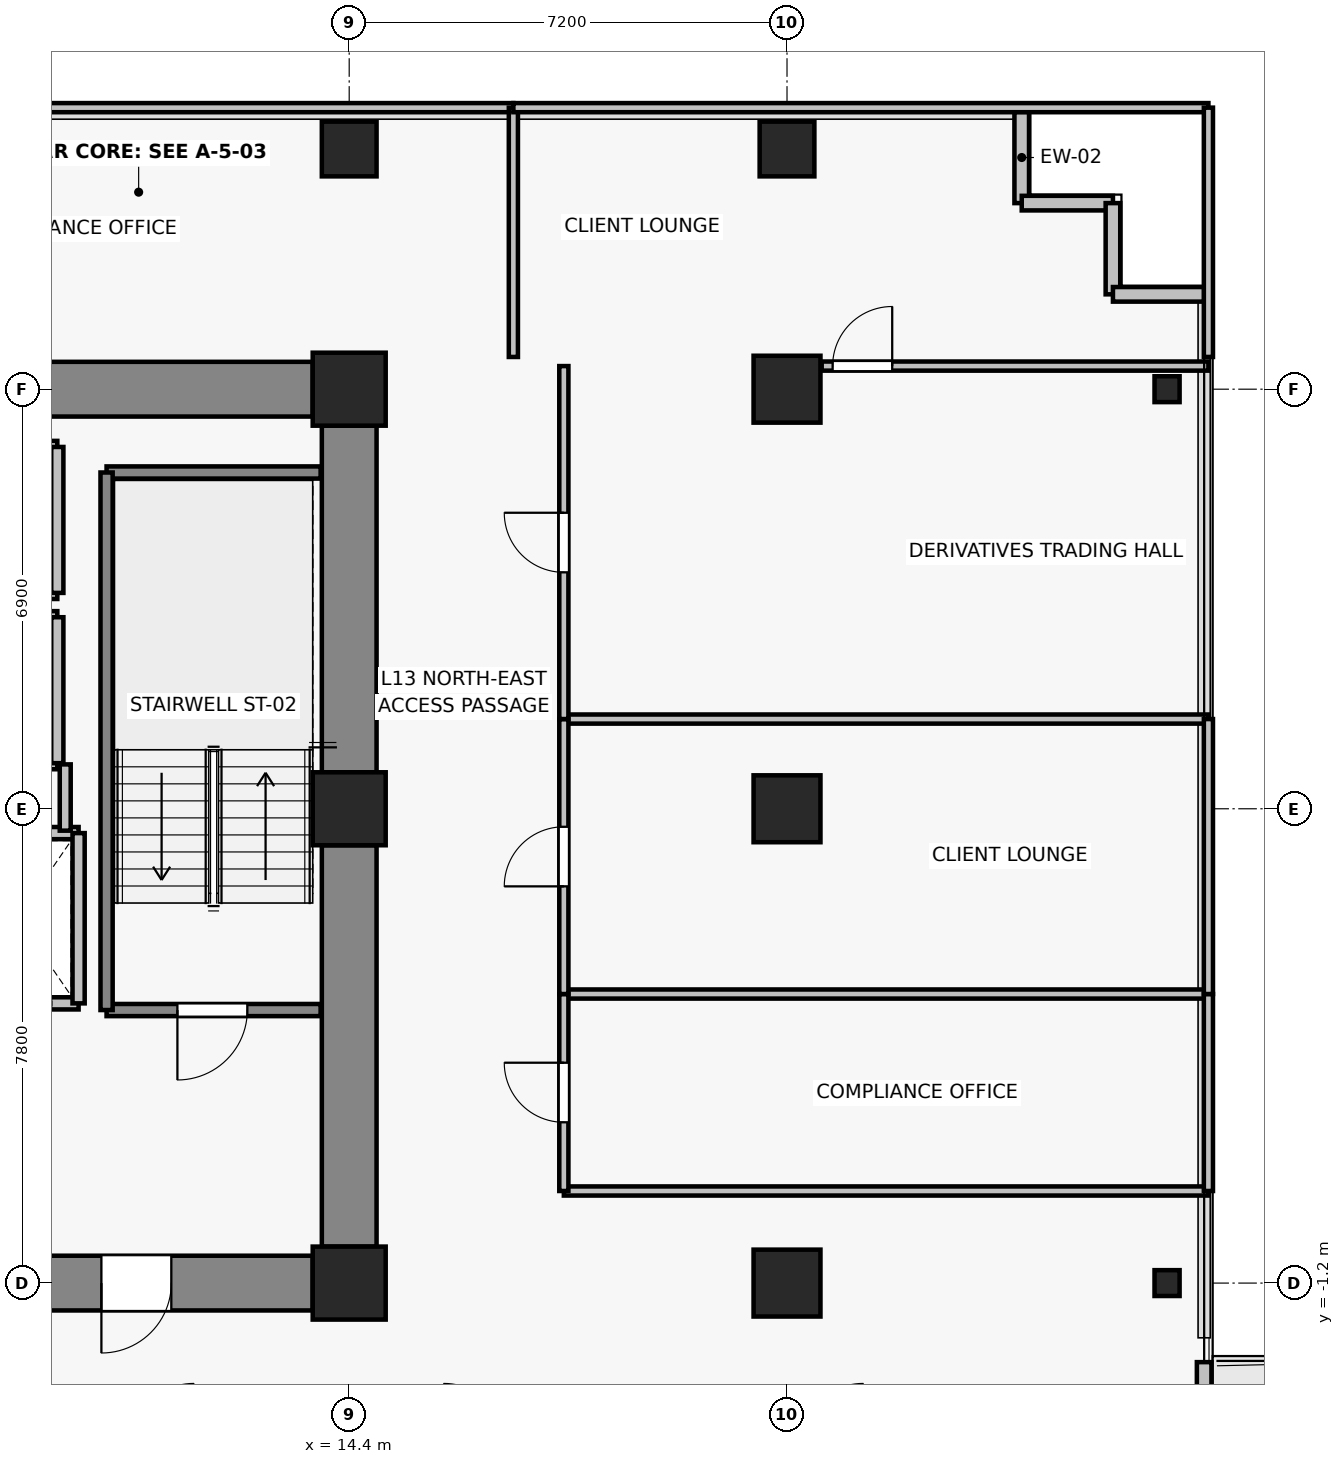
"""IFC4 building model, lengths in metres.
Left out: names, types, materials, properties, quantities, classifications, styles, units other than length and angle.
Written with IfcOpenShell. Run it as: python <this file> out.ifc"""

import sys

from ifc_helpers import new_model, si_unit, direction, frame, frame_2d, origin, origin_2d, place, context, subcontext, project, spatial, rectangle, i_section, extrude, source, transform, mapped, element, fill, save


model = new_model("IFC4")
c1 = context("Model", 3, precision=1e-05, world=origin(), true_north=direction((0.0, 1.0)))
c2 = subcontext(c1, "Body", "Model", "MODEL_VIEW")
j1 = project(units=[si_unit("LENGTHUNIT", "METRE"), si_unit("PLANEANGLEUNIT", "RADIAN")], contexts=[c1])
p1 = place(None, origin())
s1 = spatial("IfcSite", under=j1, at=p1, CompositionType="ELEMENT")
p2 = place(p1, origin())
s2 = spatial("IfcBuilding", under=s1, at=p2, CompositionType="ELEMENT")
p3 = place(p2, frame((0.0, 0.0, 50.5)))
s3 = spatial("IfcBuildingStorey", under=s2, at=p3, CompositionType="ELEMENT", Elevation=50.5)
for number, where, z_axis, x_axis in (
    (1, (14.4, -1.2, 0.0), (0.0, 0.0, 1.0), (1.0, 0.0, 0.0)),
    (2, (14.4, 6.6, 0.0), (0.0, 0.0, 1.0), (1.0, 0.0, 0.0)),
    (3, (14.4, 13.5, 0.0), (0.0, 0.0, 1.0), (1.0, 0.0, 0.0)),
):
    element("IfcColumn", number, at=place(p3, frame(where, z_axis=z_axis, x_axis=x_axis)), inside=s3, PredefinedType="COLUMN", context=c2, shape_type="SweptSolid", body=[
        extrude(rectangle(XDim=1.2, YDim=1.2, at=origin_2d()), origin(), (0.0, 0.0, 1.0), 3.3),
    ])
for number, where, z_axis, x_axis in (
    (4, (21.6, -1.2, 0.0), (0.0, 0.0, 1.0), (1.0, 0.0, 0.0)),
    (5, (21.6, 6.6, 0.0), (0.0, 0.0, 1.0), (1.0, 0.0, 0.0)),
    (6, (21.6, 13.5, 0.0), (0.0, 0.0, 1.0), (1.0, 0.0, 0.0)),
):
    element("IfcColumn", number, at=place(p3, frame(where, z_axis=z_axis, x_axis=x_axis)), inside=s3, PredefinedType="COLUMN", context=c2, shape_type="SweptSolid", body=[
        extrude(rectangle(XDim=1.1, YDim=1.1, at=origin_2d()), origin(), (0.0, 0.0, 1.0), 3.3),
    ])
for number, where, z_axis, x_axis in (
    (7, (14.4, 17.45, 0.0), (0.0, 0.0, 1.0), (1.0, 0.0, 0.0)),
    (8, (21.6, 17.45, 0.0), (0.0, 0.0, 1.0), (1.0, 0.0, 0.0)),
):
    element("IfcColumn", number, at=place(p3, frame(where, z_axis=z_axis, x_axis=x_axis)), inside=s3, PredefinedType="COLUMN", context=c2, shape_type="SweptSolid", body=[
        extrude(rectangle(XDim=0.9, YDim=0.9, at=origin_2d()), origin(), (0.0, 0.0, 1.0), 3.3),
    ])
for number, where, z_axis, x_axis in (
    (9, (27.85, -1.2, 0.0), (0.0, 0.0, 1.0), (1.0, 0.0, 0.0)),
    (10, (27.85, 13.5, 0.0), (0.0, 0.0, 1.0), (1.0, 0.0, 0.0)),
):
    element("IfcColumn", number, at=place(p3, frame(where, z_axis=z_axis, x_axis=x_axis)), inside=s3, PredefinedType="COLUMN", context=c2, shape_type="SweptSolid", body=[
        extrude(i_section(OverallWidth=0.412, OverallDepth=0.425, WebThickness=0.026, FlangeThickness=0.039, FilletRadius=0.015, at=origin_2d()), origin(), (0.0, 0.0, 1.0), 3.3),
    ])
p4 = place(p3, frame((7.8, 13.5, 0.0), z_axis=(0.0, 0.0, 1.0), x_axis=(1.0, 0.0, 0.0)))
e11 = element("IfcWall", 11, at=p4, inside=s3, PredefinedType="SHEAR", context=c2, shape_type="SweptSolid", body=[
    extrude(rectangle(XDim=6.0, YDim=0.9, at=frame_2d((3.0, 0.0))), origin(), (0.0, 0.0, 1.0), 3.075),
])
p5 = place(p3, frame((14.4, -0.6, 0.0), z_axis=(0.0, 0.0, 1.0), x_axis=(0.0, 1.0, 0.0)))
e12 = element("IfcWall", 12, at=p5, inside=s3, PredefinedType="SHEAR", context=c2, shape_type="SweptSolid", body=[
    extrude(rectangle(XDim=6.6, YDim=0.9, at=frame_2d((3.3, 0.0))), origin(), (0.0, 0.0, 1.0), 3.075),
])
p6 = place(p3, frame((14.4, 7.2, 0.0), z_axis=(0.0, 0.0, 1.0), x_axis=(0.0, 1.0, 0.0)))
e13 = element("IfcWall", 13, at=p6, inside=s3, PredefinedType="SHEAR", context=c2, shape_type="SweptSolid", body=[
    extrude(rectangle(XDim=5.7, YDim=0.9, at=frame_2d((2.85, 0.0))), origin(), (0.0, 0.0, 1.0), 3.075),
])
p7 = place(p3, frame((13.8, -1.2, 0.0), z_axis=(0.0, 0.0, 1.0), x_axis=(-1.0, 0.0, 0.0)))
e14 = element("IfcWall", 14, at=p7, inside=s3, PredefinedType="SHEAR", context=c2, shape_type="SweptSolid", body=[
    extrude(rectangle(XDim=6.0, YDim=0.9, at=frame_2d((3.0, 0.0))), origin(), (0.0, 0.0, 1.0), 3.075),
])
p8 = place(p7, frame((2.325, 0.0, 0.0)))
e15 = element("IfcOpeningElement", 15, at=p8, cuts=e14, PredefinedType="OPENING", context=c2, shape_type="SweptSolid", body=[
    extrude(rectangle(XDim=1.15, YDim=2.15, at=frame_2d((0.575, 1.075))), frame((0.0, 0.46, 0.0), z_axis=(0.0, -1.0, 0.0), x_axis=(1.0, 0.0, 0.0)), (0.0, 0.0, 1.0), 0.92),
])
p9 = place(p3, frame((28.46, -2.5, 0.0), z_axis=(0.0, 0.0, 1.0), x_axis=(0.0, -1.0, 0.0)))
e16 = element("IfcWall", 16, at=p9, inside=s3, PredefinedType="SOLIDWALL", context=c2, shape_type="SweptSolid", body=[
    extrude(rectangle(XDim=5.8, YDim=0.24, at=frame_2d((2.9, 0.0))), origin(), (0.0, 0.0, 1.0), 2.565),
])
p10 = place(p9, frame((1.566, 0.0, 0.0)))
e17 = element("IfcOpeningElement", 17, at=p10, cuts=e16, PredefinedType="OPENING", context=c2, shape_type="SweptSolid", body=[
    extrude(rectangle(XDim=1.0, YDim=2.2, at=frame_2d((0.5, 1.1))), frame((0.0, 0.13, 0.0), z_axis=(0.0, -1.0, 0.0), x_axis=(1.0, 0.0, 0.0)), (0.0, 0.0, 1.0), 0.26),
])
p11 = place(p9, frame((2.916, 0.0, 0.85)))
e18 = element("IfcOpeningElement", 18, at=p11, cuts=e16, PredefinedType="OPENING", context=c2, shape_type="SweptSolid", body=[
    extrude(rectangle(XDim=1.2, YDim=1.5, at=frame_2d((0.6, 0.75))), frame((0.0, 0.13, 0.0), z_axis=(0.0, -1.0, 0.0), x_axis=(1.0, 0.0, 0.0)), (0.0, 0.0, 1.0), 0.26),
])
for number, where, z_axis, x_axis in (
    (19, (25.46, 16.56, 0.0), (0.0, 0.0, 1.0), (0.0, 1.0, 0.0)),
    (20, (26.96, 16.56, 0.0), (0.0, 0.0, 1.0), (-1.0, 0.0, 0.0)),
    (21, (26.96, 15.06, 0.0), (0.0, 0.0, 1.0), (0.0, 1.0, 0.0)),
    (22, (28.46, 15.06, 0.0), (0.0, 0.0, 1.0), (-1.0, 0.0, 0.0)),
):
    element("IfcWall", number, at=place(p3, frame(where, z_axis=z_axis, x_axis=x_axis)), inside=s3, PredefinedType="SOLIDWALL", context=c2, shape_type="SweptSolid", body=[
        extrude(rectangle(XDim=1.5, YDim=0.24, at=frame_2d((0.75, 0.0))), origin(), (0.0, 0.0, 1.0), 3.075),
    ])
p12 = place(p3, frame((9.95, 3.4, 0.0), z_axis=(0.0, 0.0, 1.0), x_axis=(-1.0, 0.0, 0.0)))
e23 = element("IfcWall", 23, at=p12, inside=s3, PredefinedType="SOLIDWALL", context=c2, shape_type="SweptSolid", body=[
    extrude(rectangle(XDim=2.0, YDim=0.2, at=frame_2d((1.0, 0.0))), origin(), (0.0, 0.0, 1.0), 3.075),
])
p13 = place(p12, frame((0.45, 0.0, 0.0)))
e24 = element("IfcOpeningElement", 24, at=p13, cuts=e23, PredefinedType="OPENING", context=c2, shape_type="SweptSolid", body=[
    extrude(rectangle(XDim=1.1, YDim=2.2, at=frame_2d((0.55, 1.1))), frame((0.0, 0.11, 0.0), z_axis=(0.0, -1.0, 0.0), x_axis=(1.0, 0.0, 0.0)), (0.0, 0.0, 1.0), 0.22),
])
p14 = place(p3, frame((7.95, 6.2, 0.0), z_axis=(0.0, 0.0, 1.0), x_axis=(1.0, 0.0, 0.0)))
e25 = element("IfcWall", 25, at=p14, inside=s3, PredefinedType="SOLIDWALL", context=c2, shape_type="SweptSolid", body=[
    extrude(rectangle(XDim=2.0, YDim=0.2, at=frame_2d((1.0, 0.0))), origin(), (0.0, 0.0, 1.0), 3.075),
])
p15 = place(p3, frame((9.95, 6.2, 0.0), z_axis=(0.0, 0.0, 1.0), x_axis=(0.0, -1.0, 0.0)))
e26 = element("IfcWall", 26, at=p15, inside=s3, PredefinedType="SOLIDWALL", context=c2, shape_type="SweptSolid", body=[
    extrude(rectangle(XDim=2.8, YDim=0.2, at=frame_2d((1.4, 0.0))), origin(), (0.0, 0.0, 1.0), 3.075),
])
for number, where, z_axis, x_axis in (
    (27, (9.6, 7.35, 0.0), (0.0, 0.0, 1.0), (-1.0, 0.0, 0.0)),
    (28, (7.4, 9.75, 0.0), (0.0, 0.0, 1.0), (1.0, 0.0, 0.0)),
):
    element("IfcWall", number, at=place(p3, frame(where, z_axis=z_axis, x_axis=x_axis)), inside=s3, PredefinedType="SOLIDWALL", context=c2, shape_type="SweptSolid", body=[
        extrude(rectangle(XDim=2.2, YDim=0.2, at=frame_2d((1.1, 0.0))), origin(), (0.0, 0.0, 1.0), 2.465),
    ])
p16 = place(p3, frame((9.6, 9.75, 0.0), z_axis=(0.0, 0.0, 1.0), x_axis=(0.0, -1.0, 0.0)))
e29 = element("IfcWall", 29, at=p16, inside=s3, PredefinedType="SOLIDWALL", context=c2, shape_type="SweptSolid", body=[
    extrude(rectangle(XDim=2.4, YDim=0.2, at=frame_2d((1.2, 0.0))), origin(), (0.0, 0.0, 1.0), 3.075),
])
for number, where, z_axis, x_axis in (
    (30, (9.6, 10.15, 0.0), (0.0, 0.0, 1.0), (-1.0, 0.0, 0.0)),
    (31, (7.4, 12.55, 0.0), (0.0, 0.0, 1.0), (1.0, 0.0, 0.0)),
):
    element("IfcWall", number, at=place(p3, frame(where, z_axis=z_axis, x_axis=x_axis)), inside=s3, PredefinedType="SOLIDWALL", context=c2, shape_type="SweptSolid", body=[
        extrude(rectangle(XDim=2.2, YDim=0.2, at=frame_2d((1.1, 0.0))), origin(), (0.0, 0.0, 1.0), 2.465),
    ])
p17 = place(p3, frame((9.6, 12.55, 0.0), z_axis=(0.0, 0.0, 1.0), x_axis=(0.0, -1.0, 0.0)))
e32 = element("IfcWall", 32, at=p17, inside=s3, PredefinedType="SOLIDWALL", context=c2, shape_type="SweptSolid", body=[
    extrude(rectangle(XDim=2.4, YDim=0.2, at=frame_2d((1.2, 0.0))), origin(), (0.0, 0.0, 1.0), 3.075),
])
p18 = place(p3, frame((13.93, 3.29, 0.0), z_axis=(0.0, 0.0, 1.0), x_axis=(-1.0, 0.0, 0.0)))
e33 = element("IfcWall", 33, at=p18, inside=s3, PredefinedType="SOLIDWALL", context=c2, shape_type="SweptSolid", body=[
    extrude(rectangle(XDim=3.52, YDim=0.2, at=frame_2d((1.76, 0.0))), origin(), (0.0, 0.0, 1.0), 3.075),
])
p19 = place(p18, frame((1.205, 0.0, 0.0)))
e34 = element("IfcOpeningElement", 34, at=p19, cuts=e33, PredefinedType="OPENING", context=c2, shape_type="SweptSolid", body=[
    extrude(rectangle(XDim=1.15, YDim=2.15, at=frame_2d((0.575, 1.075))), frame((0.0, 0.11, 0.0), z_axis=(0.0, -1.0, 0.0), x_axis=(1.0, 0.0, 0.0)), (0.0, 0.0, 1.0), 0.22),
])
p20 = place(p3, frame((10.41, 12.13, 0.0), z_axis=(0.0, 0.0, 1.0), x_axis=(1.0, 0.0, 0.0)))
e35 = element("IfcWall", 35, at=p20, inside=s3, PredefinedType="SOLIDWALL", context=c2, shape_type="SweptSolid", body=[
    extrude(rectangle(XDim=3.52, YDim=0.2, at=frame_2d((1.76, 0.0))), origin(), (0.0, 0.0, 1.0), 3.075),
])
p21 = place(p3, frame((10.41, 3.29, 0.0), z_axis=(0.0, 0.0, 1.0), x_axis=(0.0, 1.0, 0.0)))
e36 = element("IfcWall", 36, at=p21, inside=s3, PredefinedType="SOLIDWALL", context=c2, shape_type="SweptSolid", body=[
    extrude(rectangle(XDim=8.84, YDim=0.2, at=frame_2d((4.42, 0.0))), origin(), (0.0, 0.0, 1.0), 3.075),
])
p22 = place(p3, frame((9.73, 7.33, 0.0), z_axis=(0.0, 0.0, 1.0), x_axis=(0.0, -1.0, 0.0)))
e37 = element("IfcWall", 37, at=p22, inside=s3, PredefinedType="PARTITIONING", context=c2, shape_type="SweptSolid", body=[
    extrude(rectangle(XDim=1.09, YDim=0.18, at=frame_2d((0.545, 0.0))), origin(), (0.0, 0.0, 1.0), 3.075),
])
for number, where, z_axis, x_axis in (
    (38, (28.53, 0.314, 0.0), (0.0, 0.0, 1.0), (-1.0, 0.0, 0.0)),
    (39, (17.93, 3.553, 0.0), (0.0, 0.0, 1.0), (1.0, 0.0, 0.0)),
):
    element("IfcWall", number, at=place(p3, frame(where, z_axis=z_axis, x_axis=x_axis)), inside=s3, PredefinedType="PARTITIONING", context=c2, shape_type="SweptSolid", body=[
        extrude(rectangle(XDim=10.6, YDim=0.15, at=frame_2d((5.3, 0.0))), origin(), (0.0, 0.0, 1.0), 2.465),
    ])
p23 = place(p3, frame((17.93, 0.314, 0.0), z_axis=(0.0, 0.0, 1.0), x_axis=(0.0, 1.0, 0.0)))
e40 = element("IfcWall", 40, at=p23, inside=s3, PredefinedType="PARTITIONING", context=c2, shape_type="SweptSolid", body=[
    extrude(rectangle(XDim=3.239, YDim=0.15, at=frame_2d((1.62, 0.0))), origin(), (0.0, 0.0, 1.0), 3.075),
])
p24 = place(p23, frame((1.13, 0.0, 0.0)))
e41 = element("IfcOpeningElement", 41, at=p24, cuts=e40, PredefinedType="OPENING", context=c2, shape_type="SweptSolid", body=[
    extrude(rectangle(XDim=0.98, YDim=2.15, at=frame_2d((0.49, 1.075))), frame((0.0, 0.085, 0.0), z_axis=(0.0, -1.0, 0.0), x_axis=(1.0, 0.0, 0.0)), (0.0, 0.0, 1.0), 0.17),
])
p25 = place(p3, frame((28.53, 3.553, 0.0), z_axis=(0.0, 0.0, 1.0), x_axis=(0.0, -1.0, 0.0)))
e42 = element("IfcWall", 42, at=p25, inside=s3, PredefinedType="PARTITIONING", context=c2, shape_type="SweptSolid", body=[
    extrude(rectangle(XDim=3.239, YDim=0.15, at=frame_2d((1.62, 0.0))), origin(), (0.0, 0.0, 1.0), 3.075),
])
p26 = place(p3, frame((17.93, 8.075, 0.0), z_axis=(0.0, 0.0, 1.0), x_axis=(1.0, 0.0, 0.0)))
e43 = element("IfcWall", 43, at=p26, inside=s3, PredefinedType="PARTITIONING", context=c2, shape_type="SweptSolid", body=[
    extrude(rectangle(XDim=10.6, YDim=0.15, at=frame_2d((5.3, 0.0))), origin(), (0.0, 0.0, 1.0), 2.465),
])
p27 = place(p3, frame((17.93, 3.553, 0.0), z_axis=(0.0, 0.0, 1.0), x_axis=(0.0, 1.0, 0.0)))
e44 = element("IfcWall", 44, at=p27, inside=s3, PredefinedType="PARTITIONING", context=c2, shape_type="SweptSolid", body=[
    extrude(rectangle(XDim=4.522, YDim=0.15, at=frame_2d((2.261, 0.0))), origin(), (0.0, 0.0, 1.0), 2.465),
])
p28 = place(p27, frame((1.771, 0.0, 0.0)))
e45 = element("IfcOpeningElement", 45, at=p28, cuts=e44, PredefinedType="OPENING", context=c2, shape_type="SweptSolid", body=[
    extrude(rectangle(XDim=0.98, YDim=2.15, at=frame_2d((0.49, 1.075))), frame((0.0, 0.085, 0.0), z_axis=(0.0, -1.0, 0.0), x_axis=(1.0, 0.0, 0.0)), (0.0, 0.0, 1.0), 0.17),
])
p29 = place(p3, frame((28.53, 8.075, 0.0), z_axis=(0.0, 0.0, 1.0), x_axis=(0.0, -1.0, 0.0)))
e46 = element("IfcWall", 46, at=p29, inside=s3, PredefinedType="PARTITIONING", context=c2, shape_type="SweptSolid", body=[
    extrude(rectangle(XDim=4.522, YDim=0.15, at=frame_2d((2.261, 0.0))), origin(), (0.0, 0.0, 1.0), 3.075),
])
p30 = place(p3, frame((22.17, 13.88, 0.0), z_axis=(0.0, 0.0, 1.0), x_axis=(1.0, 0.0, 0.0)))
e47 = element("IfcWall", 47, at=p30, inside=s3, PredefinedType="PARTITIONING", context=c2, shape_type="SweptSolid", body=[
    extrude(rectangle(XDim=6.36, YDim=0.15, at=frame_2d((3.18, 0.0))), origin(), (0.0, 0.0, 1.0), 3.075),
])
p31 = place(p30, frame((0.18, 0.0, 0.0)))
e48 = element("IfcOpeningElement", 48, at=p31, cuts=e47, PredefinedType="OPENING", context=c2, shape_type="SweptSolid", body=[
    extrude(rectangle(XDim=0.98, YDim=2.15, at=frame_2d((0.49, 1.075))), frame((0.0, 0.085, 0.0), z_axis=(0.0, -1.0, 0.0), x_axis=(1.0, 0.0, 0.0)), (0.0, 0.0, 1.0), 0.17),
])
p32 = place(p3, frame((17.93, 8.075, 0.0), z_axis=(0.0, 0.0, 1.0), x_axis=(0.0, 1.0, 0.0)))
e49 = element("IfcWall", 49, at=p32, inside=s3, PredefinedType="PARTITIONING", context=c2, shape_type="SweptSolid", body=[
    extrude(rectangle(XDim=5.805, YDim=0.15, at=frame_2d((2.902, 0.0))), origin(), (0.0, 0.0, 1.0), 2.465),
])
p33 = place(p32, frame((2.413, 0.0, 0.0)))
e50 = element("IfcOpeningElement", 50, at=p33, cuts=e49, PredefinedType="OPENING", context=c2, shape_type="SweptSolid", body=[
    extrude(rectangle(XDim=0.98, YDim=2.15, at=frame_2d((0.49, 1.075))), frame((0.0, 0.085, 0.0), z_axis=(0.0, -1.0, 0.0), x_axis=(1.0, 0.0, 0.0)), (0.0, 0.0, 1.0), 0.17),
])
p34 = place(p3, frame((-32.53, 18.13, 0.0), z_axis=(0.0, 0.0, 1.0), x_axis=(1.0, 0.0, 0.0)))
e51 = element("IfcWall", 51, at=p34, inside=s3, PredefinedType="PARTITIONING", context=c2, shape_type="SweptSolid", body=[
    extrude(rectangle(XDim=49.63, YDim=0.15, at=frame_2d((24.815, 0.0))), origin(), (0.0, 0.0, 1.0), 3.075),
])
p35 = place(p3, frame((17.1, 18.13, 0.0), z_axis=(0.0, 0.0, 1.0), x_axis=(0.0, -1.0, 0.0)))
e52 = element("IfcWall", 52, at=p35, inside=s3, PredefinedType="PARTITIONING", context=c2, shape_type="SweptSolid", body=[
    extrude(rectangle(XDim=4.1, YDim=0.15, at=frame_2d((2.05, 0.0))), origin(), (0.0, 0.0, 1.0), 2.465),
])
p36 = place(p3, frame((17.1, 18.13, 0.0), z_axis=(0.0, 0.0, 1.0), x_axis=(1.0, 0.0, 0.0)))
e53 = element("IfcWall", 53, at=p36, inside=s3, PredefinedType="PARTITIONING", context=c2, shape_type="SweptSolid", body=[
    extrude(rectangle(XDim=11.43, YDim=0.15, at=frame_2d((5.715, 0.0))), origin(), (0.0, 0.0, 1.0), 3.075),
])
p37 = place(p3, frame((28.53, 18.13, 0.0), z_axis=(0.0, 0.0, 1.0), x_axis=(0.0, -1.0, 0.0)))
e54 = element("IfcWall", 54, at=p37, inside=s3, PredefinedType="PARTITIONING", context=c2, shape_type="SweptSolid", body=[
    extrude(rectangle(XDim=4.1, YDim=0.15, at=frame_2d((2.05, 0.0))), origin(), (0.0, 0.0, 1.0), 3.075),
])
m1 = source(origin(), c2, "Body", "SweptSolid", [
    extrude(rectangle(XDim=1.15, YDim=2.15, at=frame_2d((0.575, 1.075))), frame((0.0, 0.025, 0.0), z_axis=(0.0, -1.0, 0.0), x_axis=(1.0, 0.0, 0.0)), (0.0, 0.0, 1.0), 0.05),
])
p38 = place(p19, origin())
e55 = element("IfcDoor", 55, at=p38, inside=s3, OperationType="SINGLE_SWING_RIGHT", PredefinedType="DOOR", context=c2, shape_type="MappedRepresentation", body=[
    mapped(m1, transform((0.0, 0.0, 0.0), x_axis=(1.0, 0.0, 0.0), y_axis=(0.0, 1.0, 0.0), z_axis=(0.0, 0.0, 1.0), scale=1.0)),
])
fill(e34, e55)
p39 = place(p8, origin())
e56 = element("IfcDoor", 56, at=p39, inside=s3, OperationType="SINGLE_SWING_RIGHT", PredefinedType="DOOR", context=c2, shape_type="MappedRepresentation", body=[
    mapped(m1, transform((0.0, 0.0, 0.0), x_axis=(1.0, 0.0, 0.0), y_axis=(0.0, 1.0, 0.0), z_axis=(0.0, 0.0, 1.0), scale=1.0)),
])
fill(e15, e56)
m2 = source(origin(), c2, "Body", "SweptSolid", [
    extrude(rectangle(XDim=0.98, YDim=2.15, at=frame_2d((0.49, 1.075))), frame((0.0, 0.025, 0.0), z_axis=(0.0, -1.0, 0.0), x_axis=(1.0, 0.0, 0.0)), (0.0, 0.0, 1.0), 0.05),
])
p40 = place(p24, origin())
e57 = element("IfcDoor", 57, at=p40, inside=s3, OperationType="SINGLE_SWING_RIGHT", PredefinedType="DOOR", context=c2, shape_type="MappedRepresentation", body=[
    mapped(m2, transform((0.0, 0.0, 0.0), x_axis=(1.0, 0.0, 0.0), y_axis=(0.0, 1.0, 0.0), z_axis=(0.0, 0.0, 1.0), scale=1.0)),
])
fill(e41, e57)
p41 = place(p28, origin())
e58 = element("IfcDoor", 58, at=p41, inside=s3, OperationType="SINGLE_SWING_LEFT", PredefinedType="DOOR", context=c2, shape_type="MappedRepresentation", body=[
    mapped(m2, transform((0.0, 0.0, 0.0), x_axis=(1.0, 0.0, 0.0), y_axis=(0.0, 1.0, 0.0), z_axis=(0.0, 0.0, 1.0), scale=1.0)),
])
fill(e45, e58)
p42 = place(p33, origin())
e59 = element("IfcDoor", 59, at=p42, inside=s3, OperationType="SINGLE_SWING_RIGHT", PredefinedType="DOOR", context=c2, shape_type="MappedRepresentation", body=[
    mapped(m2, transform((0.0, 0.0, 0.0), x_axis=(1.0, 0.0, 0.0), y_axis=(0.0, 1.0, 0.0), z_axis=(0.0, 0.0, 1.0), scale=1.0)),
])
fill(e50, e59)
p43 = place(p31, origin())
e60 = element("IfcDoor", 60, at=p43, inside=s3, OperationType="SINGLE_SWING_RIGHT", PredefinedType="DOOR", context=c2, shape_type="MappedRepresentation", body=[
    mapped(m2, transform((0.0, 0.0, 0.0), x_axis=(1.0, 0.0, 0.0), y_axis=(0.0, 1.0, 0.0), z_axis=(0.0, 0.0, 1.0), scale=1.0)),
])
fill(e48, e60)
save(model, sys.argv[1])
